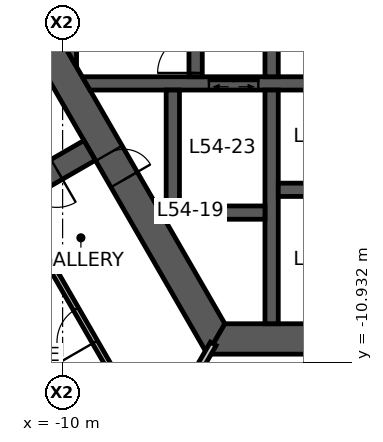
"""IFC4 building model, lengths in metres.
Left out: names, types, materials, properties, quantities, classifications, styles, units other than length and angle.
Written with IfcOpenShell. Run it as: python <this file> out.ifc"""

import sys

from ifc_helpers import new_model, si_unit, direction, frame, frame_2d, origin, place, context, subcontext, project, spatial, polyline, rectangle, outline, extrude, element, fill, save


model = new_model("IFC4")
c1 = context("Model", 3, precision=1e-05, world=origin(), true_north=direction((0.0, 1.0)))
c2 = subcontext(c1, "Body", "Model", "MODEL_VIEW")
j1 = project(units=[si_unit("LENGTHUNIT", "METRE"), si_unit("PLANEANGLEUNIT", "RADIAN")], contexts=[c1])
p1 = place(None, origin())
s1 = spatial("IfcSite", under=j1, at=p1, CompositionType="ELEMENT")
p2 = place(p1, origin())
s2 = spatial("IfcBuilding", under=s1, at=p2, CompositionType="ELEMENT")
p3 = place(p2, frame((0.0, 0.0, 216.7)))
s3 = spatial("IfcBuildingStorey", under=s2, at=p3, CompositionType="ELEMENT", Elevation=216.7)
p4 = place(p3, frame((-11.922, 0.0, 0.0), z_axis=(0.0, 0.0, 1.0), x_axis=(0.500004296715, -0.866022923061, 0.0)))
e1 = element("IfcWall", 1, at=p4, inside=s3, PredefinedType="SHEAR", context=c2, shape_type="SweptSolid", body=[
    extrude(outline(polyline([(-0.231, -0.4), (6.281, -0.4), (7.081, -0.4), (12.153, -0.4), (11.691, 0.4), (7.081, 0.4), (6.281, 0.4), (0.231, 0.4), (-0.231, -0.4)])), origin(), (0.0, 0.0, 1.0), 3.9),
])
p5 = place(p4, frame((6.281, 0.0, 0.0)))
e2 = element("IfcOpeningElement", 2, at=p5, cuts=e1, PredefinedType="OPENING", context=c2, shape_type="SweptSolid", body=[
    extrude(rectangle(XDim=0.8, YDim=2.1, at=frame_2d((0.4, 1.05))), frame((0.0, 0.41, 0.0), z_axis=(0.0, -1.0, 0.0), x_axis=(1.0, 0.0, 0.0)), (0.0, 0.0, 1.0), 0.82),
])
p6 = place(p3, frame((-5.961, -10.325, 0.0), z_axis=(0.0, 0.0, 1.0), x_axis=(1.0, 0.0, 0.0)))
e3 = element("IfcWall", 3, at=p6, inside=s3, PredefinedType="SHEAR", context=c2, shape_type="SweptSolid", body=[
    extrude(outline(polyline([(-0.231, -0.4), (5.461, -0.4), (6.461, -0.4), (12.153, -0.4), (11.691, 0.4), (6.461, 0.4), (5.461, 0.4), (0.231, 0.4), (-0.231, -0.4)])), origin(), (0.0, 0.0, 1.0), 3.9),
])
p7 = place(p6, frame((5.461, 0.0, 0.0)))
e4 = element("IfcOpeningElement", 4, at=p7, cuts=e3, PredefinedType="OPENING", context=c2, shape_type="SweptSolid", body=[
    extrude(rectangle(XDim=1.0, YDim=2.1, at=frame_2d((0.5, 1.05))), frame((0.0, 0.41, 0.0), z_axis=(0.0, -1.0, 0.0), x_axis=(1.0, 0.0, 0.0)), (0.0, 0.0, 1.0), 0.82),
])
p8 = place(p3, frame((-9.288, -5.363, 0.0), z_axis=(0.0, 0.0, 1.0), x_axis=(-0.866027473358, -0.499996415376, 0.0)))
e5 = element("IfcWall", 5, at=p8, inside=s3, PredefinedType="SHEAR", context=c2, shape_type="SweptSolid", body=[
    extrude(rectangle(XDim=7.045, YDim=0.6, at=frame_2d((3.523, 0.0))), origin(), (0.0, 0.0, 1.0), 3.9),
])
p9 = place(p8, frame((1.0, 0.0, 0.0)))
e6 = element("IfcOpeningElement", 6, at=p9, cuts=e5, PredefinedType="OPENING", context=c2, shape_type="SweptSolid", body=[
    extrude(rectangle(XDim=1.0, YDim=2.1, at=frame_2d((0.5, 1.05))), frame((0.0, 0.31, 0.0), z_axis=(0.0, -1.0, 0.0), x_axis=(1.0, 0.0, 0.0)), (0.0, 0.0, 1.0), 0.62),
])
p10 = place(p3, frame((-9.382, -3.6, 0.0), z_axis=(0.0, 0.0, 1.0), x_axis=(1.0, 0.0, 0.0)))
e7 = element("IfcWall", 7, at=p10, inside=s3, PredefinedType="SHEAR", context=c2, shape_type="SweptSolid", body=[
    extrude(outline(polyline([(0.101, -0.175), (3.232, -0.175), (4.532, -0.175), (5.782, -0.175), (6.882, -0.175), (7.957, -0.175), (7.957, 0.175), (6.882, 0.175), (5.782, 0.175), (4.532, 0.175), (3.232, 0.175), (-0.101, 0.175), (0.101, -0.175)])), origin(), (0.0, 0.0, 1.0), 3.9),
])
p11 = place(p10, frame((5.782, 0.0, 0.0)))
e8 = element("IfcOpeningElement", 8, at=p11, cuts=e7, PredefinedType="OPENING", context=c2, shape_type="SweptSolid", body=[
    extrude(rectangle(XDim=1.1, YDim=2.1, at=frame_2d((0.55, 1.05))), frame((0.0, 0.185, 0.0), z_axis=(0.0, -1.0, 0.0), x_axis=(1.0, 0.0, 0.0)), (0.0, 0.0, 1.0), 0.37),
])
p12 = place(p10, frame((3.232, 0.0, 0.0)))
e9 = element("IfcOpeningElement", 9, at=p12, cuts=e7, PredefinedType="OPENING", context=c2, shape_type="SweptSolid", body=[
    extrude(rectangle(XDim=1.3, YDim=2.1, at=frame_2d((0.65, 1.05))), frame((0.0, 0.185, 0.0), z_axis=(0.0, -1.0, 0.0), x_axis=(1.0, 0.0, 0.0)), (0.0, 0.0, 1.0), 0.37),
])
p13 = place(p3, frame((-4.5, -3.425, 0.0), z_axis=(0.0, 0.0, 1.0), x_axis=(0.0, 1.0, 0.0)))
e10 = element("IfcWall", 10, at=p13, inside=s3, PredefinedType="SHEAR", context=c2, shape_type="SweptSolid", body=[
    extrude(rectangle(XDim=6.85, YDim=0.35, at=frame_2d((3.425, 0.0))), origin(), (0.0, 0.0, 1.0), 3.9),
])
p14 = place(p13, frame((2.925, 0.0, 0.0)))
e11 = element("IfcOpeningElement", 11, at=p14, cuts=e10, PredefinedType="OPENING", context=c2, shape_type="SweptSolid", body=[
    extrude(rectangle(XDim=1.0, YDim=2.1, at=frame_2d((0.5, 1.05))), frame((0.0, 0.185, 0.0), z_axis=(0.0, -1.0, 0.0), x_axis=(1.0, 0.0, 0.0)), (0.0, 0.0, 1.0), 0.37),
])
p15 = place(p3, frame((-6.5, -3.425, 0.0), z_axis=(0.0, 0.0, 1.0), x_axis=(0.0, 1.0, 0.0)))
e12 = element("IfcWall", 12, at=p15, inside=s3, PredefinedType="SHEAR", context=c2, shape_type="SweptSolid", body=[
    extrude(rectangle(XDim=6.85, YDim=0.35, at=frame_2d((3.425, 0.0))), origin(), (0.0, 0.0, 1.0), 3.9),
])
p16 = place(p15, frame((0.1, 0.0, 0.0)))
e13 = element("IfcOpeningElement", 13, at=p16, cuts=e12, PredefinedType="OPENING", context=c2, shape_type="SweptSolid", body=[
    extrude(rectangle(XDim=1.0, YDim=2.1, at=frame_2d((0.5, 1.05))), frame((0.0, 0.185, 0.0), z_axis=(0.0, -1.0, 0.0), x_axis=(1.0, 0.0, 0.0)), (0.0, 0.0, 1.0), 0.37),
])
p17 = place(p3, frame((-4.5, -3.775, 0.0), z_axis=(0.0, 0.0, 1.0), x_axis=(0.0, -1.0, 0.0)))
e14 = element("IfcWall", 14, at=p17, inside=s3, PredefinedType="SHEAR", context=c2, shape_type="SweptSolid", body=[
    extrude(rectangle(XDim=6.15, YDim=0.35, at=frame_2d((3.075, 0.0))), origin(), (0.0, 0.0, 1.0), 3.9),
])
p18 = place(p3, frame((-4.325, -6.4, 0.0), z_axis=(0.0, 0.0, 1.0), x_axis=(1.0, 0.0, 0.0)))
e15 = element("IfcWall", 15, at=p18, inside=s3, PredefinedType="SHEAR", context=c2, shape_type="SweptSolid", body=[
    extrude(rectangle(XDim=2.55, YDim=0.35, at=frame_2d((1.275, 0.0))), origin(), (0.0, 0.0, 1.0), 3.9),
])
p19 = place(p3, frame((-7.275, -7.0, 0.0), z_axis=(0.0, 0.0, 1.0), x_axis=(1.0, 0.0, 0.0)))
e16 = element("IfcWall", 16, at=p19, inside=s3, PredefinedType="SHEAR", context=c2, shape_type="SweptSolid", body=[
    extrude(rectangle(XDim=2.6, YDim=0.35, at=frame_2d((1.3, 0.0))), origin(), (0.0, 0.0, 1.0), 3.9),
])
p20 = place(p3, frame((-7.1, -3.775, 0.0), z_axis=(0.0, 0.0, 1.0), x_axis=(0.0, -1.0, 0.0)))
e17 = element("IfcWall", 17, at=p20, inside=s3, PredefinedType="SHEAR", context=c2, shape_type="SweptSolid", body=[
    extrude(rectangle(XDim=3.05, YDim=0.35, at=frame_2d((1.525, 0.0))), origin(), (0.0, 0.0, 1.0), 3.9),
])
p21 = place(p3, frame((-9.808, -2.862, 0.0), z_axis=(0.0, 0.0, 1.0), x_axis=(0.0, 1.0, 0.0)))
e18 = element("IfcWall", 18, at=p21, inside=s3, PredefinedType="SHEAR", context=c2, shape_type="SweptSolid", body=[
    extrude(outline(polyline([(-0.303, -0.175), (6.028, -0.175), (5.421, 0.175), (0.303, 0.175), (-0.303, -0.175)])), origin(), (0.0, 0.0, 1.0), 3.9),
])
p22 = place(p3, frame((-6.035, -10.453, 0.0), z_axis=(0.0, 0.0, 1.0), x_axis=(-0.499989830942, -0.866031274813, 0.0)))
e19 = element("IfcWall", 19, at=p22, inside=s3, PredefinedType="PARTITIONING", context=c2, shape_type="SweptSolid", body=[
    extrude(rectangle(XDim=7.93, YDim=0.175, at=frame_2d((3.965, 0.0))), origin(), (0.0, 0.0, 1.0), 3.05),
])
p23 = place(p22, frame((1.13, 0.0, 0.0)))
e20 = element("IfcOpeningElement", 20, at=p23, cuts=e19, PredefinedType="OPENING", context=c2, shape_type="SweptSolid", body=[
    extrude(rectangle(XDim=1.0, YDim=2.1, at=frame_2d((0.5, 1.05))), frame((0.0, 0.098, 0.0), z_axis=(0.0, -1.0, 0.0), x_axis=(1.0, 0.0, 0.0)), (0.0, 0.0, 1.0), 0.195),
])
p24 = place(p3, frame((-7.589, -13.105, 0.0), z_axis=(0.0, 0.0, 1.0), x_axis=(-0.499986333712, 0.866033293876, 0.0)))
e21 = element("IfcWall", 21, at=p24, inside=s3, PredefinedType="PARTITIONING", context=c2, shape_type="SweptSolid", body=[
    extrude(rectangle(XDim=7.235, YDim=0.15, at=frame_2d((3.617, 0.0))), origin(), (0.0, 0.0, 1.0), 2.95),
])
p25 = place(p24, frame((3.117, 0.0, 0.0)))
e22 = element("IfcOpeningElement", 22, at=p25, cuts=e21, PredefinedType="OPENING", context=c2, shape_type="SweptSolid", body=[
    extrude(rectangle(XDim=1.0, YDim=2.1, at=frame_2d((0.5, 1.05))), frame((0.0, 0.085, 0.0), z_axis=(0.0, -1.0, 0.0), x_axis=(1.0, 0.0, 0.0)), (0.0, 0.0, 1.0), 0.17),
])
p26 = place(p5, origin())
e23 = element("IfcDoor", 23, at=p26, inside=s3, OperationType="SINGLE_SWING_RIGHT", PredefinedType="DOOR", context=c2, shape_type="SweptSolid", body=[
    extrude(rectangle(XDim=0.8, YDim=2.1, at=frame_2d((0.4, 1.05))), frame((0.0, 0.025, 0.0), z_axis=(0.0, -1.0, 0.0), x_axis=(1.0, 0.0, 0.0)), (0.0, 0.0, 1.0), 0.05),
])
fill(e2, e23)
p27 = place(p16, origin())
e24 = element("IfcDoor", 24, at=p27, inside=s3, OperationType="SINGLE_SWING_LEFT", PredefinedType="DOOR", context=c2, shape_type="SweptSolid", body=[
    extrude(rectangle(XDim=1.0, YDim=2.1, at=frame_2d((0.5, 1.05))), frame((0.0, 0.025, 0.0), z_axis=(0.0, -1.0, 0.0), x_axis=(1.0, 0.0, 0.0)), (0.0, 0.0, 1.0), 0.05),
])
fill(e13, e24)
p28 = place(p9, origin())
e25 = element("IfcDoor", 25, at=p28, inside=s3, OperationType="SINGLE_SWING_LEFT", PredefinedType="DOOR", context=c2, shape_type="SweptSolid", body=[
    extrude(rectangle(XDim=1.0, YDim=2.1, at=frame_2d((0.5, 1.05))), frame((0.0, 0.025, 0.0), z_axis=(0.0, -1.0, 0.0), x_axis=(1.0, 0.0, 0.0)), (0.0, 0.0, 1.0), 0.05),
])
fill(e6, e25)
p29 = place(p25, origin())
e26 = element("IfcDoor", 26, at=p29, inside=s3, OperationType="SINGLE_SWING_LEFT", PredefinedType="DOOR", context=c2, shape_type="SweptSolid", body=[
    extrude(rectangle(XDim=1.0, YDim=2.1, at=frame_2d((0.5, 1.05))), frame((0.0, 0.025, 0.0), z_axis=(0.0, -1.0, 0.0), x_axis=(1.0, 0.0, 0.0)), (0.0, 0.0, 1.0), 0.05),
])
fill(e22, e26)
p30 = place(p12, origin())
e27 = element("IfcDoor", 27, at=p30, inside=s3, OperationType="DOUBLE_DOOR_SLIDING", PredefinedType="DOOR", context=c2, shape_type="SweptSolid", body=[
    extrude(rectangle(XDim=1.3, YDim=2.1, at=frame_2d((0.65, 1.05))), frame((0.0, 0.025, 0.0), z_axis=(0.0, -1.0, 0.0), x_axis=(1.0, 0.0, 0.0)), (0.0, 0.0, 1.0), 0.05),
])
fill(e9, e27)
save(model, sys.argv[1])
